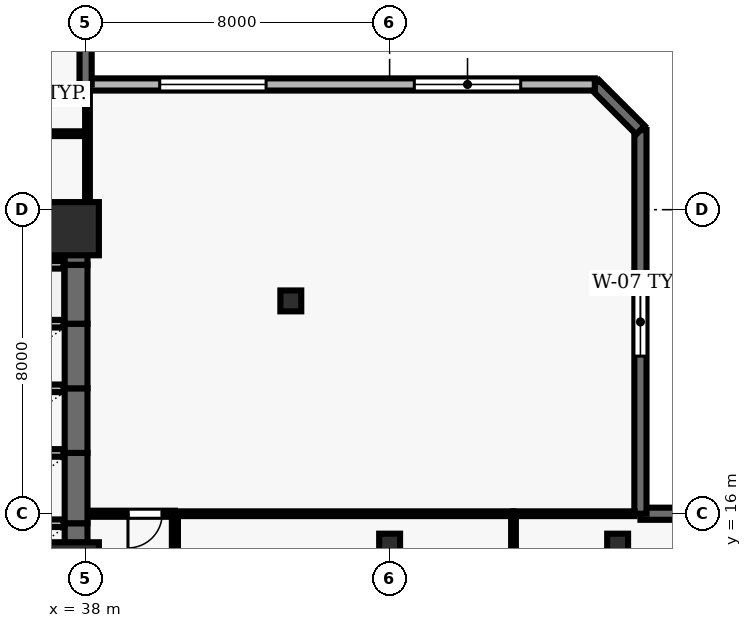
"""IFC4 building model, lengths in metres.
Left out: names, types, materials, properties, quantities, classifications, styles, units other than length and angle.
Written with IfcOpenShell. Run it as: python <this file> out.ifc"""

import sys

from ifc_helpers import new_model, si_unit, direction, frame, frame_2d, origin, origin_2d, place, context, subcontext, project, spatial, rectangle, hollow_rectangle, extrude, element, fill, save


model = new_model("IFC4")
c1 = context("Model", 3, precision=1e-05, world=origin(), true_north=direction((0.0, 1.0)))
c2 = subcontext(c1, "Body", "Model", "MODEL_VIEW")
j1 = project(units=[si_unit("LENGTHUNIT", "METRE"), si_unit("PLANEANGLEUNIT", "RADIAN")], contexts=[c1])
p1 = place(None, origin())
s1 = spatial("IfcSite", under=j1, at=p1, CompositionType="ELEMENT")
p2 = place(p1, origin())
s2 = spatial("IfcBuilding", under=s1, at=p2, CompositionType="ELEMENT")
p3 = place(p2, frame((0.0, 0.0, 58.3)))
s3 = spatial("IfcBuildingStorey", under=s2, at=p3, CompositionType="ELEMENT", Elevation=58.3)
for number, where, z_axis, x_axis in (
    (1, (37.65, 14.55, 0.0), (0.0, 0.0, 1.0), (1.0, 0.0, 0.0)),
    (2, (37.65, 23.5, 0.0), (0.0, 0.0, 1.0), (1.0, 0.0, 0.0)),
):
    element("IfcColumn", number, at=place(p3, frame(where, z_axis=z_axis, x_axis=x_axis)), inside=s3, PredefinedType="COLUMN", context=c2, shape_type="SweptSolid", body=[
        extrude(rectangle(XDim=1.4, YDim=1.4, at=origin_2d()), origin(), (0.0, 0.0, 1.0), 3.9),
    ])
for number, where, z_axis, x_axis in (
    (3, (46.0, 15.2, 0.0), (0.0, 0.0, 1.0), (1.0, 0.0, 0.0)),
    (4, (52.0, 15.2, 0.0), (0.0, 0.0, 1.0), (1.0, 0.0, 0.0)),
    (5, (43.4, 21.6, 0.0), (0.0, 0.0, 1.0), (1.0, 0.0, 0.0)),
):
    element("IfcColumn", number, at=place(p3, frame(where, z_axis=z_axis, x_axis=x_axis)), inside=s3, PredefinedType="COLUMN", context=c2, shape_type="SweptSolid", body=[
        extrude(hollow_rectangle(XDim=0.55, YDim=0.55, WallThickness=0.025, at=origin_2d()), origin(), (0.0, 0.0, 1.0), 3.9),
    ])
p4 = place(p3, frame((73.5, 16.0, 0.0), z_axis=(0.0, 0.0, 1.0), x_axis=(-1.0, 0.0, 0.0)))
e6 = element("IfcWall", 6, at=p4, inside=s3, PredefinedType="SOLIDWALL", context=c2, shape_type="SweptSolid", body=[
    extrude(rectangle(XDim=20.9, YDim=0.32, at=frame_2d((10.45, 0.0))), origin(), (0.0, 0.0, 1.0), 3.69),
])
p5 = place(p4, frame((12.05, 0.0, 0.0)))
e7 = element("IfcOpeningElement", 7, at=p5, cuts=e6, PredefinedType="OPENING", context=c2, shape_type="SweptSolid", body=[
    extrude(rectangle(XDim=1.0, YDim=2.2, at=frame_2d((0.5, 1.1))), frame((0.0, 0.17, 0.0), z_axis=(0.0, -1.0, 0.0), x_axis=(1.0, 0.0, 0.0)), (0.0, 0.0, 1.0), 0.34),
])
p6 = place(p4, frame((2.733, 0.0, 0.9)))
e8 = element("IfcOpeningElement", 8, at=p6, cuts=e6, PredefinedType="OPENING", context=c2, shape_type="SweptSolid", body=[
    extrude(rectangle(XDim=1.5, YDim=1.8, at=frame_2d((0.75, 0.9))), frame((0.0, 0.17, 0.0), z_axis=(0.0, -1.0, 0.0), x_axis=(1.0, 0.0, 0.0)), (0.0, 0.0, 1.0), 0.34),
])
p7 = place(p4, frame((16.667, 0.0, 0.9)))
e9 = element("IfcOpeningElement", 9, at=p7, cuts=e6, PredefinedType="OPENING", context=c2, shape_type="SweptSolid", body=[
    extrude(rectangle(XDim=1.5, YDim=1.8, at=frame_2d((0.75, 0.9))), frame((0.0, 0.17, 0.0), z_axis=(0.0, -1.0, 0.0), x_axis=(1.0, 0.0, 0.0)), (0.0, 0.0, 1.0), 0.34),
])
p8 = place(p3, frame((52.6, 16.0, 0.0), z_axis=(0.0, 0.0, 1.0), x_axis=(0.0, 1.0, 0.0)))
e10 = element("IfcWall", 10, at=p8, inside=s3, PredefinedType="SOLIDWALL", context=c2, shape_type="SweptSolid", body=[
    extrude(rectangle(XDim=10.095, YDim=0.32, at=frame_2d((5.047, 0.0))), origin(), (0.0, 0.0, 1.0), 3.69),
])
p9 = place(p8, frame((4.147, 0.0, 0.9)))
e11 = element("IfcOpeningElement", 11, at=p9, cuts=e10, PredefinedType="OPENING", context=c2, shape_type="SweptSolid", body=[
    extrude(rectangle(XDim=1.8, YDim=1.8, at=frame_2d((0.9, 0.9))), frame((0.0, 0.17, 0.0), z_axis=(0.0, -1.0, 0.0), x_axis=(1.0, 0.0, 0.0)), (0.0, 0.0, 1.0), 0.34),
])
p10 = place(p3, frame((52.6, 26.095, 0.0), z_axis=(0.0, 0.0, 1.0), x_axis=(-0.707178703759, 0.707034851297, 0.0)))
e12 = element("IfcWall", 12, at=p10, inside=s3, PredefinedType="SOLIDWALL", context=c2, shape_type="SweptSolid", body=[
    extrude(rectangle(XDim=1.697, YDim=0.32, at=frame_2d((0.849, 0.0))), origin(), (0.0, 0.0, 1.0), 3.69),
])
p11 = place(p3, frame((51.4, 27.295, 0.0), z_axis=(0.0, 0.0, 1.0), x_axis=(-1.0, 0.0, 0.0)))
e13 = element("IfcWall", 13, at=p11, inside=s3, PredefinedType="SOLIDWALL", context=c2, shape_type="SweptSolid", body=[
    extrude(rectangle(XDim=13.4, YDim=0.32, at=frame_2d((6.7, 0.0))), origin(), (0.0, 0.0, 1.0), 3.69),
])
p12 = place(p11, frame((1.95, 0.0, 0.9)))
e14 = element("IfcOpeningElement", 14, at=p12, cuts=e13, PredefinedType="OPENING", context=c2, shape_type="SweptSolid", body=[
    extrude(rectangle(XDim=2.8, YDim=1.8, at=frame_2d((1.4, 0.9))), frame((0.0, 0.17, 0.0), z_axis=(0.0, -1.0, 0.0), x_axis=(1.0, 0.0, 0.0)), (0.0, 0.0, 1.0), 0.34),
])
p13 = place(p11, frame((8.65, 0.0, 0.9)))
e15 = element("IfcOpeningElement", 15, at=p13, cuts=e13, PredefinedType="OPENING", context=c2, shape_type="SweptSolid", body=[
    extrude(rectangle(XDim=2.8, YDim=1.8, at=frame_2d((1.4, 0.9))), frame((0.0, 0.17, 0.0), z_axis=(0.0, -1.0, 0.0), x_axis=(1.0, 0.0, 0.0)), (0.0, 0.0, 1.0), 0.34),
])
p14 = place(p3, frame((38.0, 27.295, 0.0), z_axis=(0.0, 0.0, 1.0), x_axis=(0.0, 1.0, 0.0)))
e16 = element("IfcWall", 16, at=p14, inside=s3, PredefinedType="SOLIDWALL", context=c2, shape_type="SweptSolid", body=[
    extrude(rectangle(XDim=24.205, YDim=0.32, at=frame_2d((12.103, 0.0))), origin(), (0.0, 0.0, 1.0), 3.69),
])
p15 = place(p14, frame((16.303, 0.0, 0.0)))
e17 = element("IfcOpeningElement", 17, at=p15, cuts=e16, PredefinedType="OPENING", context=c2, shape_type="SweptSolid", body=[
    extrude(rectangle(XDim=1.0, YDim=2.2, at=frame_2d((0.5, 1.1))), frame((0.0, 0.17, 0.0), z_axis=(0.0, -1.0, 0.0), x_axis=(1.0, 0.0, 0.0)), (0.0, 0.0, 1.0), 0.34),
])
p16 = place(p14, frame((9.077, 0.0, 0.9)))
e18 = element("IfcOpeningElement", 18, at=p16, cuts=e16, PredefinedType="OPENING", context=c2, shape_type="SweptSolid", body=[
    extrude(rectangle(XDim=1.8, YDim=2.2, at=frame_2d((0.9, 1.1))), frame((0.0, 0.17, 0.0), z_axis=(0.0, -1.0, 0.0), x_axis=(1.0, 0.0, 0.0)), (0.0, 0.0, 1.0), 0.34),
])
p17 = place(p14, frame((20.279, 0.0, 0.9)))
e19 = element("IfcOpeningElement", 19, at=p17, cuts=e16, PredefinedType="OPENING", context=c2, shape_type="SweptSolid", body=[
    extrude(rectangle(XDim=1.8, YDim=2.2, at=frame_2d((0.9, 1.1))), frame((0.0, 0.17, 0.0), z_axis=(0.0, -1.0, 0.0), x_axis=(1.0, 0.0, 0.0)), (0.0, 0.0, 1.0), 0.34),
])
p18 = place(p3, frame((37.75, 13.9, 0.0), z_axis=(0.0, 0.0, 1.0), x_axis=(0.0, 1.0, 0.0)))
e20 = element("IfcWall", 20, at=p18, inside=s3, PredefinedType="SHEAR", context=c2, shape_type="SweptSolid", body=[
    extrude(rectangle(XDim=1.85, YDim=0.6, at=frame_2d((0.925, 0.0))), origin(), (0.0, 0.0, 1.0), 3.69),
])
p19 = place(p3, frame((37.42, 15.75, 0.0), z_axis=(0.0, 0.0, 1.0), x_axis=(-1.0, 0.0, 0.0)))
e21 = element("IfcWall", 21, at=p19, inside=s3, PredefinedType="SOLIDWALL", context=c2, shape_type="SweptSolid", body=[
    extrude(rectangle(XDim=2.14, YDim=0.2, at=frame_2d((1.07, 0.0))), origin(), (0.0, 0.0, 1.0), 3.69),
])
p20 = place(p3, frame((37.75, 15.75, 0.0), z_axis=(0.0, 0.0, 1.0), x_axis=(0.0, 1.0, 0.0)))
e22 = element("IfcWall", 22, at=p20, inside=s3, PredefinedType="SHEAR", context=c2, shape_type="SweptSolid", body=[
    extrude(rectangle(XDim=1.85, YDim=0.6, at=frame_2d((0.925, 0.0))), origin(), (0.0, 0.0, 1.0), 3.69),
])
p21 = place(p3, frame((37.42, 17.6, 0.0), z_axis=(0.0, 0.0, 1.0), x_axis=(-1.0, 0.0, 0.0)))
e23 = element("IfcWall", 23, at=p21, inside=s3, PredefinedType="SOLIDWALL", context=c2, shape_type="SweptSolid", body=[
    extrude(rectangle(XDim=2.14, YDim=0.2, at=frame_2d((1.07, 0.0))), origin(), (0.0, 0.0, 1.0), 3.69),
])
p22 = place(p3, frame((37.75, 17.6, 0.0), z_axis=(0.0, 0.0, 1.0), x_axis=(0.0, 1.0, 0.0)))
e24 = element("IfcWall", 24, at=p22, inside=s3, PredefinedType="SHEAR", context=c2, shape_type="SweptSolid", body=[
    extrude(rectangle(XDim=1.7, YDim=0.6, at=frame_2d((0.85, 0.0))), origin(), (0.0, 0.0, 1.0), 3.69),
])
p23 = place(p3, frame((37.42, 19.3, 0.0), z_axis=(0.0, 0.0, 1.0), x_axis=(-1.0, 0.0, 0.0)))
e25 = element("IfcWall", 25, at=p23, inside=s3, PredefinedType="SOLIDWALL", context=c2, shape_type="SweptSolid", body=[
    extrude(rectangle(XDim=2.14, YDim=0.2, at=frame_2d((1.07, 0.0))), origin(), (0.0, 0.0, 1.0), 3.69),
])
p24 = place(p3, frame((37.75, 19.3, 0.0), z_axis=(0.0, 0.0, 1.0), x_axis=(0.0, 1.0, 0.0)))
e26 = element("IfcWall", 26, at=p24, inside=s3, PredefinedType="SHEAR", context=c2, shape_type="SweptSolid", body=[
    extrude(rectangle(XDim=1.7, YDim=0.6, at=frame_2d((0.85, 0.0))), origin(), (0.0, 0.0, 1.0), 3.69),
])
p25 = place(p3, frame((37.42, 21.0, 0.0), z_axis=(0.0, 0.0, 1.0), x_axis=(-1.0, 0.0, 0.0)))
e27 = element("IfcWall", 27, at=p25, inside=s3, PredefinedType="SOLIDWALL", context=c2, shape_type="SweptSolid", body=[
    extrude(rectangle(XDim=2.14, YDim=0.2, at=frame_2d((1.07, 0.0))), origin(), (0.0, 0.0, 1.0), 3.69),
])
p26 = place(p3, frame((37.75, 21.0, 0.0), z_axis=(0.0, 0.0, 1.0), x_axis=(0.0, 1.0, 0.0)))
e28 = element("IfcWall", 28, at=p26, inside=s3, PredefinedType="SHEAR", context=c2, shape_type="SweptSolid", body=[
    extrude(rectangle(XDim=1.55, YDim=0.6, at=frame_2d((0.775, 0.0))), origin(), (0.0, 0.0, 1.0), 3.69),
])
p27 = place(p3, frame((37.42, 22.55, 0.0), z_axis=(0.0, 0.0, 1.0), x_axis=(-1.0, 0.0, 0.0)))
e29 = element("IfcWall", 29, at=p27, inside=s3, PredefinedType="SOLIDWALL", context=c2, shape_type="SweptSolid", body=[
    extrude(rectangle(XDim=2.14, YDim=0.2, at=frame_2d((1.07, 0.0))), origin(), (0.0, 0.0, 1.0), 3.69),
])
p28 = place(p3, frame((37.75, 22.55, 0.0), z_axis=(0.0, 0.0, 1.0), x_axis=(0.0, 1.0, 0.0)))
e30 = element("IfcWall", 30, at=p28, inside=s3, PredefinedType="SHEAR", context=c2, shape_type="SweptSolid", body=[
    extrude(rectangle(XDim=1.5, YDim=0.6, at=frame_2d((0.75, 0.0))), origin(), (0.0, 0.0, 1.0), 3.69),
])
p29 = place(p3, frame((37.42, 24.05, 0.0), z_axis=(0.0, 0.0, 1.0), x_axis=(-1.0, 0.0, 0.0)))
e31 = element("IfcWall", 31, at=p29, inside=s3, PredefinedType="SOLIDWALL", context=c2, shape_type="SweptSolid", body=[
    extrude(rectangle(XDim=2.14, YDim=0.2, at=frame_2d((1.07, 0.0))), origin(), (0.0, 0.0, 1.0), 3.69),
])
p30 = place(p3, frame((35.15, 26.0, 0.0), z_axis=(0.0, 0.0, 1.0), x_axis=(1.0, 0.0, 0.0)))
e32 = element("IfcWall", 32, at=p30, inside=s3, PredefinedType="PARTITIONING", context=c2, shape_type="SweptSolid", body=[
    extrude(rectangle(XDim=2.7, YDim=0.125, at=frame_2d((1.35, 0.0))), origin(), (0.0, 0.0, 1.0), 3.69),
])
p31 = place(p3, frame((40.35, 16.0, 0.0), z_axis=(0.0, 0.0, 1.0), x_axis=(-1.0, 0.0, 0.0)))
e33 = element("IfcWall", 33, at=p31, inside=s3, PredefinedType="PARTITIONING", context=c2, shape_type="SweptSolid", body=[
    extrude(rectangle(XDim=2.27, YDim=0.16, at=frame_2d((1.135, 0.0))), origin(), (0.0, 0.0, 1.0), 3.69),
])
p32 = place(p31, frame((0.335, 0.0, 0.0)))
e34 = element("IfcOpeningElement", 34, at=p32, cuts=e33, PredefinedType="OPENING", context=c2, shape_type="SweptSolid", body=[
    extrude(rectangle(XDim=0.9, YDim=2.1, at=frame_2d((0.45, 1.05))), frame((0.0, 0.09, 0.0), z_axis=(0.0, -1.0, 0.0), x_axis=(1.0, 0.0, 0.0)), (0.0, 0.0, 1.0), 0.18),
])
p33 = place(p3, frame((49.26, 16.0, 0.0), z_axis=(0.0, 0.0, 1.0), x_axis=(1.0, 0.0, 0.0)))
e35 = element("IfcWall", 35, at=p33, inside=s3, PredefinedType="PARTITIONING", context=c2, shape_type="SweptSolid", body=[
    extrude(rectangle(XDim=3.185, YDim=0.125, at=frame_2d((1.593, 0.0))), origin(), (0.0, 0.0, 1.0), 3.39),
])
p34 = place(p3, frame((49.26, 16.0, 0.0), z_axis=(0.0, 0.0, 1.0), x_axis=(-1.0, 0.0, 0.0)))
e36 = element("IfcWall", 36, at=p34, inside=s3, PredefinedType="PARTITIONING", context=c2, shape_type="SweptSolid", body=[
    extrude(rectangle(XDim=8.91, YDim=0.125, at=frame_2d((4.455, 0.0))), origin(), (0.0, 0.0, 1.0), 3.39),
])
p35 = place(p3, frame((38.05, 27.14, 0.0), z_axis=(0.0, 0.0, 1.0), x_axis=(0.0, -1.0, 0.0)))
e37 = element("IfcWall", 37, at=p35, inside=s3, PredefinedType="PARTITIONING", context=c2, shape_type="SweptSolid", body=[
    extrude(rectangle(XDim=3.09, YDim=0.125, at=frame_2d((1.545, 0.0))), origin(), (0.0, 0.0, 1.0), 3.055),
])
p36 = place(p3, frame((40.35, 10.425, 0.0), z_axis=(0.0, 0.0, 1.0), x_axis=(0.0, 1.0, 0.0)))
e38 = element("IfcWall", 38, at=p36, inside=s3, PredefinedType="PARTITIONING", context=c2, shape_type="SweptSolid", body=[
    extrude(rectangle(XDim=5.5, YDim=0.16, at=frame_2d((2.75, 0.0))), origin(), (0.0, 0.0, 1.0), 3.277),
])
p37 = place(p3, frame((49.26, 10.425, 0.0), z_axis=(0.0, 0.0, 1.0), x_axis=(0.0, 1.0, 0.0)))
e39 = element("IfcWall", 39, at=p37, inside=s3, PredefinedType="PARTITIONING", context=c2, shape_type="SweptSolid", body=[
    extrude(rectangle(XDim=5.518, YDim=0.125, at=frame_2d((2.759, 0.0))), origin(), (0.0, 0.0, 1.0), 3.69),
])
p38 = place(p9, origin())
e40 = element("IfcWindow", 40, at=p38, inside=s3, PartitioningType="SINGLE_PANEL", PredefinedType="WINDOW", context=c2, shape_type="SweptSolid", body=[
    extrude(rectangle(XDim=1.8, YDim=1.8, at=frame_2d((0.9, 0.9))), frame((0.0, 0.03, 0.0), z_axis=(0.0, -1.0, 0.0), x_axis=(1.0, 0.0, 0.0)), (0.0, 0.0, 1.0), 0.06),
])
fill(e11, e40)
p39 = place(p12, origin())
e41 = element("IfcWindow", 41, at=p39, inside=s3, PartitioningType="SINGLE_PANEL", PredefinedType="WINDOW", context=c2, shape_type="SweptSolid", body=[
    extrude(rectangle(XDim=2.8, YDim=1.8, at=frame_2d((1.4, 0.9))), frame((0.0, 0.03, 0.0), z_axis=(0.0, -1.0, 0.0), x_axis=(1.0, 0.0, 0.0)), (0.0, 0.0, 1.0), 0.06),
])
fill(e14, e41)
p40 = place(p13, origin())
e42 = element("IfcWindow", 42, at=p40, inside=s3, PartitioningType="SINGLE_PANEL", PredefinedType="WINDOW", context=c2, shape_type="SweptSolid", body=[
    extrude(rectangle(XDim=2.8, YDim=1.8, at=frame_2d((1.4, 0.9))), frame((0.0, 0.03, 0.0), z_axis=(0.0, -1.0, 0.0), x_axis=(1.0, 0.0, 0.0)), (0.0, 0.0, 1.0), 0.06),
])
fill(e15, e42)
p41 = place(p32, origin())
e43 = element("IfcDoor", 43, at=p41, inside=s3, OperationType="SINGLE_SWING_RIGHT", PredefinedType="DOOR", context=c2, shape_type="SweptSolid", body=[
    extrude(rectangle(XDim=0.9, YDim=2.1, at=frame_2d((0.45, 1.05))), frame((0.0, 0.025, 0.0), z_axis=(0.0, -1.0, 0.0), x_axis=(1.0, 0.0, 0.0)), (0.0, 0.0, 1.0), 0.05),
])
fill(e34, e43)
save(model, sys.argv[1])
